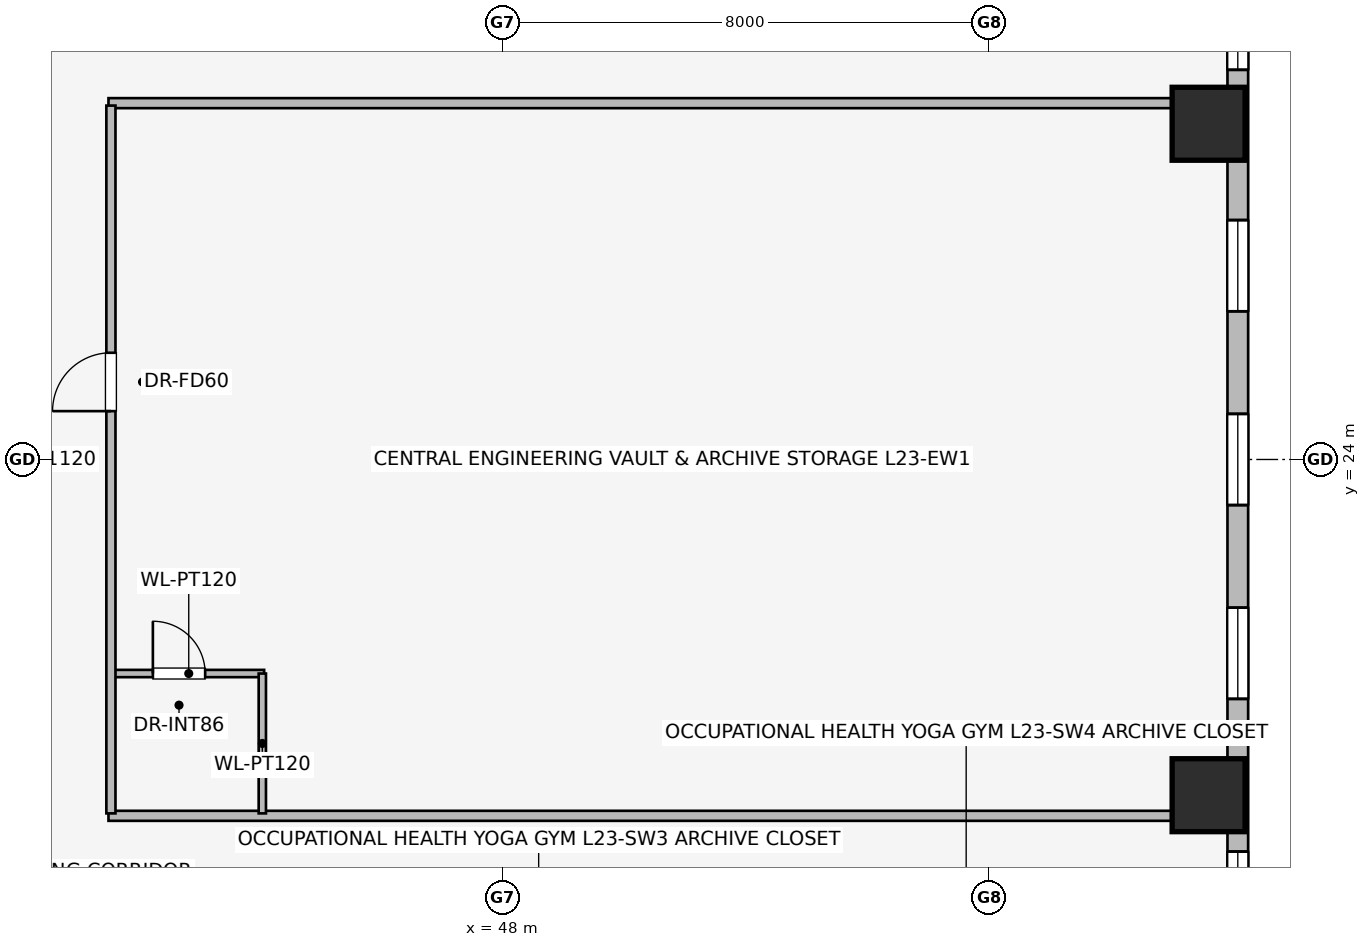
"""IFC4 building model, lengths in metres.
Left out: names, types, materials, properties, quantities, classifications, styles, units other than length and angle.
Written with IfcOpenShell. Run it as: python <this file> out.ifc"""

import sys

from ifc_helpers import new_model, si_unit, direction, frame, frame_2d, origin, origin_2d, place, context, subcontext, project, spatial, rectangle, extrude, element, fill, save


model = new_model("IFC4")
c1 = context("Model", 3, precision=1e-05, world=origin(), true_north=direction((0.0, 1.0)))
c2 = subcontext(c1, "Body", "Model", "MODEL_VIEW")
j1 = project(units=[si_unit("LENGTHUNIT", "METRE"), si_unit("PLANEANGLEUNIT", "RADIAN")], contexts=[c1])
p1 = place(None, origin())
s1 = spatial("IfcSite", under=j1, at=p1, CompositionType="ELEMENT")
p2 = place(p1, origin())
s2 = spatial("IfcBuilding", under=s1, at=p2, CompositionType="ELEMENT")
p3 = place(p2, frame((0.0, 0.0, 89.05)))
s3 = spatial("IfcBuildingStorey", under=s2, at=p3, CompositionType="ELEMENT", Elevation=89.05)
for number, where, z_axis, x_axis in (
    (1, (59.613, 18.479, 0.0), (0.0, 0.0, 1.0), (1.0, 0.0, 0.0)),
    (2, (59.613, 29.521, 0.0), (0.0, 0.0, 1.0), (1.0, 0.0, 0.0)),
):
    element("IfcColumn", number, at=place(p3, frame(where, z_axis=z_axis, x_axis=x_axis)), inside=s3, PredefinedType="COLUMN", context=c2, shape_type="SweptSolid", body=[
        extrude(rectangle(XDim=1.2, YDim=1.2, at=origin_2d()), origin(), (0.0, 0.0, 1.0), 3.65),
    ])
p4 = place(p3, frame((60.093, 33.202, 0.0), z_axis=(0.0, 0.0, 1.0), x_axis=(0.0, -1.0, 0.0)))
e3 = element("IfcWall", 3, at=p4, inside=s3, PredefinedType="STANDARD", context=c2, shape_type="SweptSolid", body=[
    extrude(rectangle(XDim=18.404, YDim=0.34, at=frame_2d((9.202, 0.0))), origin(), (0.0, 0.0, 1.0), 2.684),
])
p5 = place(p4, frame((1.744, 0.0, 0.75)))
e4 = element("IfcOpeningElement", 4, at=p5, cuts=e3, PredefinedType="OPENING", context=c2, shape_type="SweptSolid", body=[
    extrude(rectangle(XDim=1.05, YDim=1.4, at=frame_2d((0.525, 0.7))), frame((0.0, 0.18, 0.0), z_axis=(0.0, -1.0, 0.0), x_axis=(1.0, 0.0, 0.0)), (0.0, 0.0, 1.0), 0.36),
])
p6 = place(p4, frame((5.265, 0.0, 0.75)))
e5 = element("IfcOpeningElement", 5, at=p6, cuts=e3, PredefinedType="OPENING", context=c2, shape_type="SweptSolid", body=[
    extrude(rectangle(XDim=1.5, YDim=1.5, at=frame_2d((0.75, 0.75))), frame((0.0, 0.18, 0.0), z_axis=(0.0, -1.0, 0.0), x_axis=(1.0, 0.0, 0.0)), (0.0, 0.0, 1.0), 0.36),
])
p7 = place(p4, frame((8.452, 0.0, 0.75)))
e6 = element("IfcOpeningElement", 6, at=p7, cuts=e3, PredefinedType="OPENING", context=c2, shape_type="SweptSolid", body=[
    extrude(rectangle(XDim=1.5, YDim=1.5, at=frame_2d((0.75, 0.75))), frame((0.0, 0.18, 0.0), z_axis=(0.0, -1.0, 0.0), x_axis=(1.0, 0.0, 0.0)), (0.0, 0.0, 1.0), 0.36),
])
p8 = place(p4, frame((11.639, 0.0, 0.75)))
e7 = element("IfcOpeningElement", 7, at=p8, cuts=e3, PredefinedType="OPENING", context=c2, shape_type="SweptSolid", body=[
    extrude(rectangle(XDim=1.5, YDim=1.5, at=frame_2d((0.75, 0.75))), frame((0.0, 0.18, 0.0), z_axis=(0.0, -1.0, 0.0), x_axis=(1.0, 0.0, 0.0)), (0.0, 0.0, 1.0), 0.36),
])
p9 = place(p4, frame((15.65, 0.0, 0.75)))
e8 = element("IfcOpeningElement", 8, at=p9, cuts=e3, PredefinedType="OPENING", context=c2, shape_type="SweptSolid", body=[
    extrude(rectangle(XDim=1.05, YDim=1.4, at=frame_2d((0.525, 0.7))), frame((0.0, 0.18, 0.0), z_axis=(0.0, -1.0, 0.0), x_axis=(1.0, 0.0, 0.0)), (0.0, 0.0, 1.0), 0.36),
])
for number, where, z_axis, x_axis in (
    (9, (41.52, 18.14, 0.0), (0.0, 0.0, 1.0), (1.0, 0.0, 0.0)),
    (10, (41.52, 29.86, 0.0), (0.0, 0.0, 1.0), (1.0, 0.0, 0.0)),
):
    element("IfcWall", number, at=place(p3, frame(where, z_axis=z_axis, x_axis=x_axis)), inside=s3, PredefinedType="PARTITIONING", context=c2, shape_type="SweptSolid", body=[
        extrude(rectangle(XDim=18.453, YDim=0.165, at=frame_2d((9.227, 0.0))), origin(), (0.0, 0.0, 1.0), 3.39),
    ])
p10 = place(p3, frame((41.6, 20.48, 0.0), z_axis=(0.0, 0.0, 1.0), x_axis=(1.0, 0.0, 0.0)))
e11 = element("IfcWall", 11, at=p10, inside=s3, PredefinedType="PARTITIONING", context=c2, shape_type="SweptSolid", body=[
    extrude(rectangle(XDim=2.48, YDim=0.12, at=frame_2d((1.24, 0.0))), origin(), (0.0, 0.0, 1.0), 3.39),
])
p11 = place(p10, frame((0.65, 0.0, 0.0)))
e12 = element("IfcOpeningElement", 12, at=p11, cuts=e11, PredefinedType="OPENING", context=c2, shape_type="SweptSolid", body=[
    extrude(rectangle(XDim=0.86, YDim=2.0, at=frame_2d((0.43, 1.0))), frame((0.0, 0.07, 0.0), z_axis=(0.0, -1.0, 0.0), x_axis=(1.0, 0.0, 0.0)), (0.0, 0.0, 1.0), 0.14),
])
p12 = place(p3, frame((44.05, 18.18, 0.0), z_axis=(0.0, 0.0, 1.0), x_axis=(0.0, 1.0, 0.0)))
e13 = element("IfcWall", 13, at=p12, inside=s3, PredefinedType="PARTITIONING", context=c2, shape_type="SweptSolid", body=[
    extrude(rectangle(XDim=2.3, YDim=0.12, at=frame_2d((1.15, 0.0))), origin(), (0.0, 0.0, 1.0), 3.39),
])
p13 = place(p3, frame((41.56, 18.18, 0.0), z_axis=(0.0, 0.0, 1.0), x_axis=(0.0, 1.0, 0.0)))
e14 = element("IfcWall", 14, at=p13, inside=s3, PredefinedType="PARTITIONING", context=c2, shape_type="SweptSolid", body=[
    extrude(rectangle(XDim=11.64, YDim=0.15, at=frame_2d((5.82, 0.0))), origin(), (0.0, 0.0, 1.0), 3.39),
])
p14 = place(p13, frame((6.615, 0.0, 0.0)))
e15 = element("IfcOpeningElement", 15, at=p14, cuts=e14, PredefinedType="OPENING", context=c2, shape_type="SweptSolid", body=[
    extrude(rectangle(XDim=0.96, YDim=2.0, at=frame_2d((0.48, 1.0))), frame((0.0, 0.085, 0.0), z_axis=(0.0, -1.0, 0.0), x_axis=(1.0, 0.0, 0.0)), (0.0, 0.0, 1.0), 0.17),
])
p15 = place(p5, origin())
e16 = element("IfcWindow", 16, at=p15, inside=s3, PartitioningType="SINGLE_PANEL", PredefinedType="WINDOW", context=c2, shape_type="SweptSolid", body=[
    extrude(rectangle(XDim=1.05, YDim=1.4, at=frame_2d((0.525, 0.7))), frame((0.0, 0.03, 0.0), z_axis=(0.0, -1.0, 0.0), x_axis=(1.0, 0.0, 0.0)), (0.0, 0.0, 1.0), 0.06),
])
fill(e4, e16)
p16 = place(p6, origin())
e17 = element("IfcWindow", 17, at=p16, inside=s3, PartitioningType="SINGLE_PANEL", PredefinedType="WINDOW", context=c2, shape_type="SweptSolid", body=[
    extrude(rectangle(XDim=1.5, YDim=1.5, at=frame_2d((0.75, 0.75))), frame((0.0, 0.03, 0.0), z_axis=(0.0, -1.0, 0.0), x_axis=(1.0, 0.0, 0.0)), (0.0, 0.0, 1.0), 0.06),
])
fill(e5, e17)
p17 = place(p7, origin())
e18 = element("IfcWindow", 18, at=p17, inside=s3, PartitioningType="SINGLE_PANEL", PredefinedType="WINDOW", context=c2, shape_type="SweptSolid", body=[
    extrude(rectangle(XDim=1.5, YDim=1.5, at=frame_2d((0.75, 0.75))), frame((0.0, 0.03, 0.0), z_axis=(0.0, -1.0, 0.0), x_axis=(1.0, 0.0, 0.0)), (0.0, 0.0, 1.0), 0.06),
])
fill(e6, e18)
p18 = place(p8, origin())
e19 = element("IfcWindow", 19, at=p18, inside=s3, PartitioningType="SINGLE_PANEL", PredefinedType="WINDOW", context=c2, shape_type="SweptSolid", body=[
    extrude(rectangle(XDim=1.5, YDim=1.5, at=frame_2d((0.75, 0.75))), frame((0.0, 0.03, 0.0), z_axis=(0.0, -1.0, 0.0), x_axis=(1.0, 0.0, 0.0)), (0.0, 0.0, 1.0), 0.06),
])
fill(e7, e19)
p19 = place(p9, origin())
e20 = element("IfcWindow", 20, at=p19, inside=s3, PartitioningType="SINGLE_PANEL", PredefinedType="WINDOW", context=c2, shape_type="SweptSolid", body=[
    extrude(rectangle(XDim=1.05, YDim=1.4, at=frame_2d((0.525, 0.7))), frame((0.0, 0.03, 0.0), z_axis=(0.0, -1.0, 0.0), x_axis=(1.0, 0.0, 0.0)), (0.0, 0.0, 1.0), 0.06),
])
fill(e8, e20)
p20 = place(p11, origin())
e21 = element("IfcDoor", 21, at=p20, inside=s3, OperationType="SINGLE_SWING_LEFT", PredefinedType="DOOR", context=c2, shape_type="SweptSolid", body=[
    extrude(rectangle(XDim=0.86, YDim=2.0, at=frame_2d((0.43, 1.0))), frame((0.0, 0.025, 0.0), z_axis=(0.0, -1.0, 0.0), x_axis=(1.0, 0.0, 0.0)), (0.0, 0.0, 1.0), 0.05),
])
fill(e12, e21)
p21 = place(p14, origin())
e22 = element("IfcDoor", 22, at=p21, inside=s3, OperationType="SINGLE_SWING_LEFT", PredefinedType="DOOR", context=c2, shape_type="SweptSolid", body=[
    extrude(rectangle(XDim=0.96, YDim=2.0, at=frame_2d((0.48, 1.0))), frame((0.0, 0.025, 0.0), z_axis=(0.0, -1.0, 0.0), x_axis=(1.0, 0.0, 0.0)), (0.0, 0.0, 1.0), 0.05),
])
fill(e15, e22)
save(model, sys.argv[1])
